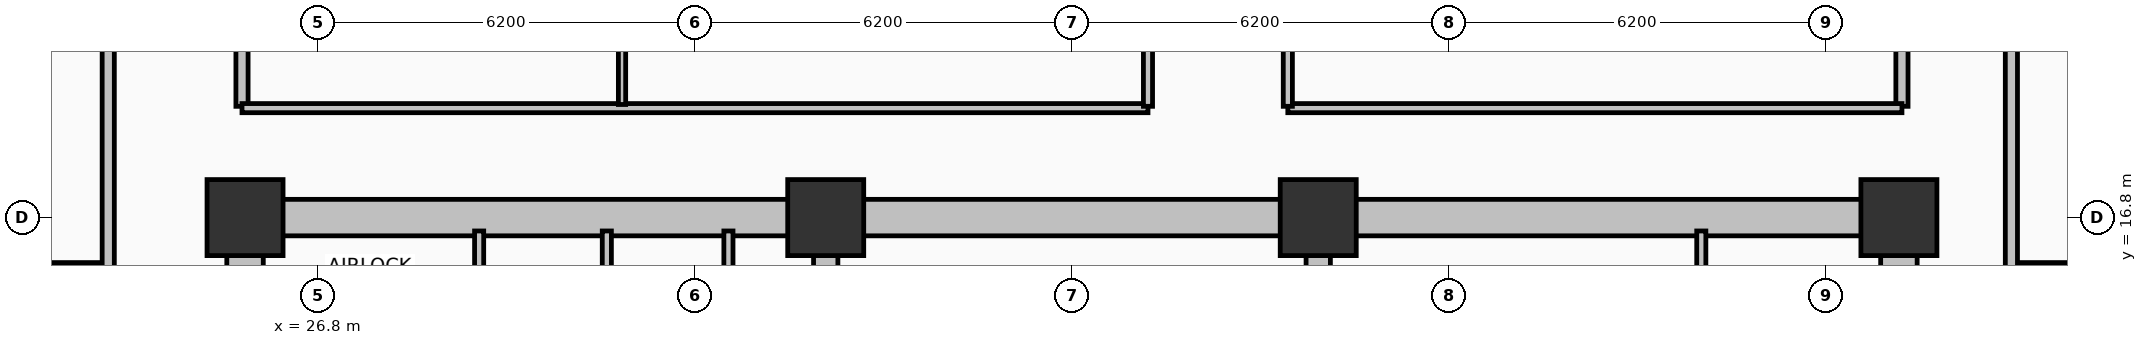
"""IFC4 building model, lengths in metres.
Left out: names, types, materials, properties, quantities, classifications, styles, units other than length and angle.
Written with IfcOpenShell. Run it as: python <this file> out.ifc"""

import sys

from ifc_helpers import new_model, si_unit, direction, frame, frame_2d, origin, origin_2d, place, context, subcontext, project, spatial, rectangle, extrude, element, fill, save


model = new_model("IFC4")
c1 = context("Model", 3, precision=1e-05, world=origin(), true_north=direction((0.0, 1.0)))
c2 = subcontext(c1, "Body", "Model", "MODEL_VIEW")
j1 = project(units=[si_unit("LENGTHUNIT", "METRE"), si_unit("PLANEANGLEUNIT", "RADIAN")], contexts=[c1])
p1 = place(None, origin())
s1 = spatial("IfcSite", under=j1, at=p1, CompositionType="ELEMENT")
p2 = place(p1, origin())
s2 = spatial("IfcBuilding", under=s1, at=p2, CompositionType="ELEMENT")
p3 = place(p2, frame((0.0, 0.0, 36.2)))
s3 = spatial("IfcBuildingStorey", under=s2, at=p3, CompositionType="ELEMENT", Elevation=36.2)
for number, where, z_axis, x_axis in (
    (1, (25.6, 10.9, 0.0), (0.0, 0.0, 1.0), (0.0, 1.0, 0.0)),
    (2, (52.8, 10.9, 0.0), (0.0, 0.0, 1.0), (0.0, 1.0, 0.0)),
):
    element("IfcWall", number, at=place(p3, frame(where, z_axis=z_axis, x_axis=x_axis)), inside=s3, PredefinedType="SHEAR", context=c2, shape_type="SweptSolid", body=[
        extrude(rectangle(XDim=5.6, YDim=0.6, at=frame_2d((2.8, 0.0))), origin(), (0.0, 0.0, 1.0), 3.7),
    ])
p4 = place(p3, frame((25.6, 16.8, 0.0), z_axis=(0.0, 0.0, 1.0), x_axis=(1.0, 0.0, 0.0)))
e3 = element("IfcWall", 3, at=p4, inside=s3, PredefinedType="SHEAR", context=c2, shape_type="SweptSolid", body=[
    extrude(rectangle(XDim=27.2, YDim=0.6, at=frame_2d((13.6, 0.0))), origin(), (0.0, 0.0, 1.0), 3.7),
])
p5 = place(p4, frame((1.7, 0.0, 0.0)))
e4 = element("IfcOpeningElement", 4, at=p5, cuts=e3, PredefinedType="OPENING", context=c2, shape_type="SweptSolid", body=[
    extrude(rectangle(XDim=1.1, YDim=2.15, at=frame_2d((0.55, 1.075))), frame((0.0, 0.31, 0.0), z_axis=(0.0, -1.0, 0.0), x_axis=(1.0, 0.0, 0.0)), (0.0, 0.0, 1.0), 0.62),
])
p6 = place(p4, frame((4.45, 0.0, 0.0)))
e5 = element("IfcOpeningElement", 5, at=p6, cuts=e3, PredefinedType="OPENING", context=c2, shape_type="SweptSolid", body=[
    extrude(rectangle(XDim=0.85, YDim=2.1, at=frame_2d((0.425, 1.05))), frame((0.0, 0.31, 0.0), z_axis=(0.0, -1.0, 0.0), x_axis=(1.0, 0.0, 0.0)), (0.0, 0.0, 1.0), 0.62),
])
p7 = place(p4, frame((6.5, 0.0, 0.0)))
e6 = element("IfcOpeningElement", 6, at=p7, cuts=e3, PredefinedType="OPENING", context=c2, shape_type="SweptSolid", body=[
    extrude(rectangle(XDim=0.85, YDim=2.1, at=frame_2d((0.425, 1.05))), frame((0.0, 0.31, 0.0), z_axis=(0.0, -1.0, 0.0), x_axis=(1.0, 0.0, 0.0)), (0.0, 0.0, 1.0), 0.62),
])
p8 = place(p4, frame((13.0, 0.0, 0.0)))
e7 = element("IfcOpeningElement", 7, at=p8, cuts=e3, PredefinedType="OPENING", context=c2, shape_type="SweptSolid", body=[
    extrude(rectangle(XDim=1.2, YDim=2.15, at=frame_2d((0.6, 1.075))), frame((0.0, 0.31, 0.0), z_axis=(0.0, -1.0, 0.0), x_axis=(1.0, 0.0, 0.0)), (0.0, 0.0, 1.0), 0.62),
])
p9 = place(p4, frame((20.4, 0.0, 0.0)))
e8 = element("IfcOpeningElement", 8, at=p9, cuts=e3, PredefinedType="OPENING", context=c2, shape_type="SweptSolid", body=[
    extrude(rectangle(XDim=1.3, YDim=2.2, at=frame_2d((0.65, 1.1))), frame((0.0, 0.31, 0.0), z_axis=(0.0, -1.0, 0.0), x_axis=(1.0, 0.0, 0.0)), (0.0, 0.0, 1.0), 0.62),
])
p10 = place(p4, frame((24.65, 0.0, 0.0)))
e9 = element("IfcOpeningElement", 9, at=p10, cuts=e3, PredefinedType="OPENING", context=c2, shape_type="SweptSolid", body=[
    extrude(rectangle(XDim=0.85, YDim=2.1, at=frame_2d((0.425, 1.05))), frame((0.0, 0.31, 0.0), z_axis=(0.0, -1.0, 0.0), x_axis=(1.0, 0.0, 0.0)), (0.0, 0.0, 1.0), 0.62),
])
for number, where, z_axis, x_axis in (
    (10, (35.15, 10.9, 0.0), (0.0, 0.0, 1.0), (0.0, 1.0, 0.0)),
    (11, (43.25, 10.9, 0.0), (0.0, 0.0, 1.0), (0.0, 1.0, 0.0)),
):
    element("IfcWall", number, at=place(p3, frame(where, z_axis=z_axis, x_axis=x_axis)), inside=s3, PredefinedType="SHEAR", context=c2, shape_type="SweptSolid", body=[
        extrude(rectangle(XDim=5.6, YDim=0.4, at=frame_2d((2.8, 0.0))), origin(), (0.0, 0.0, 1.0), 3.7),
    ])
for number, where, z_axis, x_axis in (
    (12, (25.6, 16.8, 0.0), (0.0, 0.0, 1.0), (1.0, 0.0, 0.0)),
    (13, (35.15, 16.8, 0.0), (0.0, 0.0, 1.0), (1.0, 0.0, 0.0)),
    (14, (43.25, 16.8, 0.0), (0.0, 0.0, 1.0), (1.0, 0.0, 0.0)),
    (15, (52.8, 16.8, 0.0), (0.0, 0.0, 1.0), (1.0, 0.0, 0.0)),
):
    element("IfcColumn", number, at=place(p3, frame(where, z_axis=z_axis, x_axis=x_axis)), inside=s3, PredefinedType="COLUMN", context=c2, shape_type="SweptSolid", body=[
        extrude(rectangle(XDim=1.25, YDim=1.25, at=origin_2d()), origin(), (0.0, 0.0, 1.0), 3.7),
    ])
for number, where, z_axis, x_axis in (
    (16, (29.45, 14.5, 0.0), (0.0, 0.0, 1.0), (0.0, 1.0, 0.0)),
    (17, (31.55, 14.5, 0.0), (0.0, 0.0, 1.0), (0.0, 1.0, 0.0)),
):
    element("IfcWall", number, at=place(p3, frame(where, z_axis=z_axis, x_axis=x_axis)), inside=s3, PredefinedType="PARTITIONING", context=c2, shape_type="SweptSolid", body=[
        extrude(rectangle(XDim=2.08, YDim=0.15, at=frame_2d((1.04, 0.0))), origin(), (0.0, 0.0, 1.0), 2.53),
    ])
p11 = place(p3, frame((33.55, 14.5, 0.0), z_axis=(0.0, 0.0, 1.0), x_axis=(0.0, 1.0, 0.0)))
e18 = element("IfcWall", 18, at=p11, inside=s3, PredefinedType="PARTITIONING", context=c2, shape_type="SweptSolid", body=[
    extrude(rectangle(XDim=2.08, YDim=0.15, at=frame_2d((1.04, 0.0))), origin(), (0.0, 0.0, 1.0), 2.53),
])
p12 = place(p11, frame((0.55, 0.0, 0.0)))
e19 = element("IfcOpeningElement", 19, at=p12, cuts=e18, PredefinedType="OPENING", context=c2, shape_type="SweptSolid", body=[
    extrude(rectangle(XDim=0.85, YDim=2.05, at=frame_2d((0.425, 1.025))), frame((0.0, 0.085, 0.0), z_axis=(0.0, -1.0, 0.0), x_axis=(1.0, 0.0, 0.0)), (0.0, 0.0, 1.0), 0.17),
])
p13 = place(p3, frame((49.55, 13.7, 0.0), z_axis=(0.0, 0.0, 1.0), x_axis=(0.0, 1.0, 0.0)))
e20 = element("IfcWall", 20, at=p13, inside=s3, PredefinedType="PARTITIONING", context=c2, shape_type="SweptSolid", body=[
    extrude(rectangle(XDim=2.88, YDim=0.15, at=frame_2d((1.44, 0.0))), origin(), (0.0, 0.0, 1.0), 2.53),
])
for number, where, z_axis, x_axis in (
    (21, (25.55, 18.63, 0.0), (0.0, 0.0, 1.0), (0.0, 1.0, 0.0)),
    (22, (52.85, 18.63, 0.0), (0.0, 0.0, 1.0), (0.0, 1.0, 0.0)),
):
    element("IfcWall", number, at=place(p3, frame(where, z_axis=z_axis, x_axis=x_axis)), inside=s3, PredefinedType="PARTITIONING", context=c2, shape_type="SweptSolid", body=[
        extrude(rectangle(XDim=19.14, YDim=0.2, at=frame_2d((9.57, 0.0))), origin(), (0.0, 0.0, 1.0), 2.53),
    ])
p14 = place(p3, frame((25.55, 18.6, 0.0), z_axis=(0.0, 0.0, 1.0), x_axis=(1.0, 0.0, 0.0)))
e23 = element("IfcWall", 23, at=p14, inside=s3, PredefinedType="PARTITIONING", context=c2, shape_type="SweptSolid", body=[
    extrude(rectangle(XDim=14.9, YDim=0.15, at=frame_2d((7.45, 0.0))), origin(), (0.0, 0.0, 1.0), 2.53),
])
p15 = place(p3, frame((42.75, 18.6, 0.0), z_axis=(0.0, 0.0, 1.0), x_axis=(1.0, 0.0, 0.0)))
e24 = element("IfcWall", 24, at=p15, inside=s3, PredefinedType="PARTITIONING", context=c2, shape_type="SweptSolid", body=[
    extrude(rectangle(XDim=10.1, YDim=0.15, at=frame_2d((5.05, 0.0))), origin(), (0.0, 0.0, 1.0), 2.53),
])
p16 = place(p3, frame((31.8, 18.66, 0.0), z_axis=(0.0, 0.0, 1.0), x_axis=(0.0, 1.0, 0.0)))
e25 = element("IfcWall", 25, at=p16, inside=s3, PredefinedType="PARTITIONING", context=c2, shape_type="SweptSolid", body=[
    extrude(rectangle(XDim=9.49, YDim=0.12, at=frame_2d((4.745, 0.0))), origin(), (0.0, 0.0, 1.0), 2.53),
])
p17 = place(p16, frame((2.2, 0.0, 0.0)))
e26 = element("IfcOpeningElement", 26, at=p17, cuts=e25, PredefinedType="OPENING", context=c2, shape_type="SweptSolid", body=[
    extrude(rectangle(XDim=0.9, YDim=2.1, at=frame_2d((0.45, 1.05))), frame((0.0, 0.07, 0.0), z_axis=(0.0, -1.0, 0.0), x_axis=(1.0, 0.0, 0.0)), (0.0, 0.0, 1.0), 0.14),
])
p18 = place(p3, frame((40.45, 18.63, 0.0), z_axis=(0.0, 0.0, 1.0), x_axis=(0.0, 1.0, 0.0)))
e27 = element("IfcWall", 27, at=p18, inside=s3, PredefinedType="PARTITIONING", context=c2, shape_type="SweptSolid", body=[
    extrude(rectangle(XDim=19.14, YDim=0.15, at=frame_2d((9.57, 0.0))), origin(), (0.0, 0.0, 1.0), 2.53),
])
p19 = place(p18, frame((2.4, 0.0, 0.0)))
e28 = element("IfcOpeningElement", 28, at=p19, cuts=e27, PredefinedType="OPENING", context=c2, shape_type="SweptSolid", body=[
    extrude(rectangle(XDim=1.0, YDim=2.15, at=frame_2d((0.5, 1.075))), frame((0.0, 0.085, 0.0), z_axis=(0.0, -1.0, 0.0), x_axis=(1.0, 0.0, 0.0)), (0.0, 0.0, 1.0), 0.17),
])
p20 = place(p18, frame((11.4, 0.0, 0.0)))
e29 = element("IfcOpeningElement", 29, at=p20, cuts=e27, PredefinedType="OPENING", context=c2, shape_type="SweptSolid", body=[
    extrude(rectangle(XDim=1.0, YDim=2.15, at=frame_2d((0.5, 1.075))), frame((0.0, 0.085, 0.0), z_axis=(0.0, -1.0, 0.0), x_axis=(1.0, 0.0, 0.0)), (0.0, 0.0, 1.0), 0.17),
])
p21 = place(p3, frame((42.75, 18.63, 0.0), z_axis=(0.0, 0.0, 1.0), x_axis=(0.0, 1.0, 0.0)))
e30 = element("IfcWall", 30, at=p21, inside=s3, PredefinedType="PARTITIONING", context=c2, shape_type="SweptSolid", body=[
    extrude(rectangle(XDim=19.14, YDim=0.15, at=frame_2d((9.57, 0.0))), origin(), (0.0, 0.0, 1.0), 2.53),
])
p22 = place(p21, frame((5.5, 0.0, 0.0)))
e31 = element("IfcOpeningElement", 31, at=p22, cuts=e30, PredefinedType="OPENING", context=c2, shape_type="SweptSolid", body=[
    extrude(rectangle(XDim=1.0, YDim=2.15, at=frame_2d((0.5, 1.075))), frame((0.0, 0.085, 0.0), z_axis=(0.0, -1.0, 0.0), x_axis=(1.0, 0.0, 0.0)), (0.0, 0.0, 1.0), 0.17),
])
p23 = place(p3, frame((21.1, 16.0, 0.0), z_axis=(0.0, 0.0, 1.0), x_axis=(1.0, 0.0, 0.0)))
e32 = element("IfcWall", 32, at=p23, inside=s3, PredefinedType="PARTITIONING", context=c2, shape_type="SweptSolid", body=[
    extrude(rectangle(XDim=2.25, YDim=0.12, at=frame_2d((1.125, 0.0))), origin(), (0.0, 0.0, 1.0), 2.53),
])
p24 = place(p23, frame((0.6, 0.0, 0.0)))
e33 = element("IfcOpeningElement", 33, at=p24, cuts=e32, PredefinedType="OPENING", context=c2, shape_type="SweptSolid", body=[
    extrude(rectangle(XDim=0.85, YDim=2.1, at=frame_2d((0.425, 1.05))), frame((0.0, 0.07, 0.0), z_axis=(0.0, -1.0, 0.0), x_axis=(1.0, 0.0, 0.0)), (0.0, 0.0, 1.0), 0.14),
])
p25 = place(p3, frame((23.35, 10.6, 0.0), z_axis=(0.0, 0.0, 1.0), x_axis=(0.0, 1.0, 0.0)))
e34 = element("IfcWall", 34, at=p25, inside=s3, PredefinedType="PARTITIONING", context=c2, shape_type="SweptSolid", body=[
    extrude(rectangle(XDim=35.2, YDim=0.2, at=frame_2d((17.6, 0.0))), origin(), (0.0, 0.0, 1.0), 2.53),
])
p26 = place(p25, frame((2.65, 0.0, 0.0)))
e35 = element("IfcOpeningElement", 35, at=p26, cuts=e34, PredefinedType="OPENING", context=c2, shape_type="SweptSolid", body=[
    extrude(rectangle(XDim=1.0, YDim=2.15, at=frame_2d((0.5, 1.075))), frame((0.0, 0.11, 0.0), z_axis=(0.0, -1.0, 0.0), x_axis=(1.0, 0.0, 0.0)), (0.0, 0.0, 1.0), 0.22),
])
p27 = place(p25, frame((12.65, 0.0, 0.0)))
e36 = element("IfcOpeningElement", 36, at=p27, cuts=e34, PredefinedType="OPENING", context=c2, shape_type="SweptSolid", body=[
    extrude(rectangle(XDim=1.0, YDim=2.15, at=frame_2d((0.5, 1.075))), frame((0.0, 0.11, 0.0), z_axis=(0.0, -1.0, 0.0), x_axis=(1.0, 0.0, 0.0)), (0.0, 0.0, 1.0), 0.22),
])
p28 = place(p25, frame((24.134, 0.0, 0.0)))
e37 = element("IfcOpeningElement", 37, at=p28, cuts=e34, PredefinedType="OPENING", context=c2, shape_type="SweptSolid", body=[
    extrude(rectangle(XDim=1.0, YDim=2.15, at=frame_2d((0.5, 1.075))), frame((0.0, 0.11, 0.0), z_axis=(0.0, -1.0, 0.0), x_axis=(1.0, 0.0, 0.0)), (0.0, 0.0, 1.0), 0.22),
])
p29 = place(p3, frame((54.65, 16.0, 0.0), z_axis=(0.0, 0.0, 1.0), x_axis=(1.0, 0.0, 0.0)))
e38 = element("IfcWall", 38, at=p29, inside=s3, PredefinedType="PARTITIONING", context=c2, shape_type="SweptSolid", body=[
    extrude(rectangle(XDim=2.25, YDim=0.12, at=frame_2d((1.125, 0.0))), origin(), (0.0, 0.0, 1.0), 2.53),
])
p30 = place(p29, frame((0.6, 0.0, 0.0)))
e39 = element("IfcOpeningElement", 39, at=p30, cuts=e38, PredefinedType="OPENING", context=c2, shape_type="SweptSolid", body=[
    extrude(rectangle(XDim=0.85, YDim=2.1, at=frame_2d((0.425, 1.05))), frame((0.0, 0.07, 0.0), z_axis=(0.0, -1.0, 0.0), x_axis=(1.0, 0.0, 0.0)), (0.0, 0.0, 1.0), 0.14),
])
p31 = place(p3, frame((54.65, 10.6, 0.0), z_axis=(0.0, 0.0, 1.0), x_axis=(0.0, 1.0, 0.0)))
e40 = element("IfcWall", 40, at=p31, inside=s3, PredefinedType="PARTITIONING", context=c2, shape_type="SweptSolid", body=[
    extrude(rectangle(XDim=35.2, YDim=0.2, at=frame_2d((17.6, 0.0))), origin(), (0.0, 0.0, 1.0), 2.53),
])
p32 = place(p31, frame((2.65, 0.0, 0.0)))
e41 = element("IfcOpeningElement", 41, at=p32, cuts=e40, PredefinedType="OPENING", context=c2, shape_type="SweptSolid", body=[
    extrude(rectangle(XDim=1.0, YDim=2.15, at=frame_2d((0.5, 1.075))), frame((0.0, 0.11, 0.0), z_axis=(0.0, -1.0, 0.0), x_axis=(1.0, 0.0, 0.0)), (0.0, 0.0, 1.0), 0.22),
])
p33 = place(p31, frame((19.95, 0.0, 0.0)))
e42 = element("IfcOpeningElement", 42, at=p33, cuts=e40, PredefinedType="OPENING", context=c2, shape_type="SweptSolid", body=[
    extrude(rectangle(XDim=1.0, YDim=2.15, at=frame_2d((0.5, 1.075))), frame((0.0, 0.11, 0.0), z_axis=(0.0, -1.0, 0.0), x_axis=(1.0, 0.0, 0.0)), (0.0, 0.0, 1.0), 0.22),
])
p34 = place(p24, origin())
e43 = element("IfcDoor", 43, at=p34, inside=s3, OperationType="SINGLE_SWING_LEFT", PredefinedType="DOOR", context=c2, shape_type="SweptSolid", body=[
    extrude(rectangle(XDim=0.85, YDim=2.1, at=frame_2d((0.425, 1.05))), frame((0.0, 0.025, 0.0), z_axis=(0.0, -1.0, 0.0), x_axis=(1.0, 0.0, 0.0)), (0.0, 0.0, 1.0), 0.05),
])
fill(e33, e43)
p35 = place(p30, origin())
e44 = element("IfcDoor", 44, at=p35, inside=s3, OperationType="SINGLE_SWING_RIGHT", PredefinedType="DOOR", context=c2, shape_type="SweptSolid", body=[
    extrude(rectangle(XDim=0.85, YDim=2.1, at=frame_2d((0.425, 1.05))), frame((0.0, 0.025, 0.0), z_axis=(0.0, -1.0, 0.0), x_axis=(1.0, 0.0, 0.0)), (0.0, 0.0, 1.0), 0.05),
])
fill(e39, e44)
p36 = place(p5, origin())
e45 = element("IfcDoor", 45, at=p36, inside=s3, OperationType="SINGLE_SWING_RIGHT", PredefinedType="DOOR", context=c2, shape_type="SweptSolid", body=[
    extrude(rectangle(XDim=1.1, YDim=2.15, at=frame_2d((0.55, 1.075))), frame((0.0, 0.025, 0.0), z_axis=(0.0, -1.0, 0.0), x_axis=(1.0, 0.0, 0.0)), (0.0, 0.0, 1.0), 0.05),
])
fill(e4, e45)
p37 = place(p6, origin())
e46 = element("IfcDoor", 46, at=p37, inside=s3, OperationType="SINGLE_SWING_LEFT", PredefinedType="DOOR", context=c2, shape_type="SweptSolid", body=[
    extrude(rectangle(XDim=0.85, YDim=2.1, at=frame_2d((0.425, 1.05))), frame((0.0, 0.025, 0.0), z_axis=(0.0, -1.0, 0.0), x_axis=(1.0, 0.0, 0.0)), (0.0, 0.0, 1.0), 0.05),
])
fill(e5, e46)
p38 = place(p7, origin())
e47 = element("IfcDoor", 47, at=p38, inside=s3, OperationType="SINGLE_SWING_RIGHT", PredefinedType="DOOR", context=c2, shape_type="SweptSolid", body=[
    extrude(rectangle(XDim=0.85, YDim=2.1, at=frame_2d((0.425, 1.05))), frame((0.0, 0.025, 0.0), z_axis=(0.0, -1.0, 0.0), x_axis=(1.0, 0.0, 0.0)), (0.0, 0.0, 1.0), 0.05),
])
fill(e6, e47)
p39 = place(p8, origin())
e48 = element("IfcDoor", 48, at=p39, inside=s3, OperationType="SINGLE_SWING_LEFT", PredefinedType="DOOR", context=c2, shape_type="SweptSolid", body=[
    extrude(rectangle(XDim=1.2, YDim=2.15, at=frame_2d((0.6, 1.075))), frame((0.0, 0.025, 0.0), z_axis=(0.0, -1.0, 0.0), x_axis=(1.0, 0.0, 0.0)), (0.0, 0.0, 1.0), 0.05),
])
fill(e7, e48)
p40 = place(p9, origin())
e49 = element("IfcDoor", 49, at=p40, inside=s3, OperationType="SINGLE_SWING_RIGHT", PredefinedType="DOOR", context=c2, shape_type="SweptSolid", body=[
    extrude(rectangle(XDim=1.3, YDim=2.2, at=frame_2d((0.65, 1.1))), frame((0.0, 0.025, 0.0), z_axis=(0.0, -1.0, 0.0), x_axis=(1.0, 0.0, 0.0)), (0.0, 0.0, 1.0), 0.05),
])
fill(e8, e49)
p41 = place(p10, origin())
e50 = element("IfcDoor", 50, at=p41, inside=s3, OperationType="SINGLE_SWING_LEFT", PredefinedType="DOOR", context=c2, shape_type="SweptSolid", body=[
    extrude(rectangle(XDim=0.85, YDim=2.1, at=frame_2d((0.425, 1.05))), frame((0.0, 0.025, 0.0), z_axis=(0.0, -1.0, 0.0), x_axis=(1.0, 0.0, 0.0)), (0.0, 0.0, 1.0), 0.05),
])
fill(e9, e50)
save(model, sys.argv[1])
